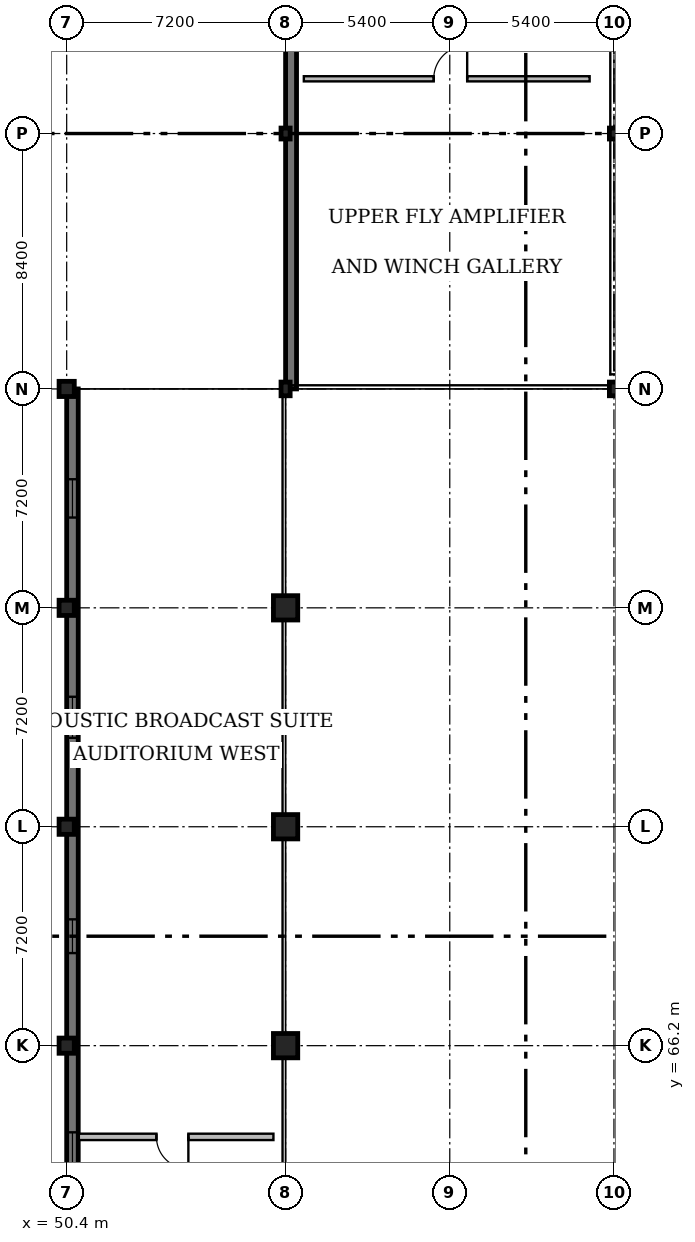
"""IFC4 building model, lengths in metres.
Left out: names, types, materials, properties, quantities, classifications, styles, units other than length and angle.
Written with IfcOpenShell. Run it as: python <this file> out.ifc"""

import sys

from ifc_helpers import new_model, si_unit, direction, frame, frame_2d, origin, origin_2d, place, context, subcontext, project, spatial, rectangle, i_section, extrude, element, fill, save


model = new_model("IFC4")
c1 = context("Model", 3, precision=1e-05, world=origin(), true_north=direction((0.0, 1.0)))
c2 = subcontext(c1, "Body", "Model", "MODEL_VIEW")
j1 = project(units=[si_unit("LENGTHUNIT", "METRE"), si_unit("PLANEANGLEUNIT", "RADIAN")], contexts=[c1])
p1 = place(None, origin())
s1 = spatial("IfcSite", under=j1, at=p1, CompositionType="ELEMENT")
p2 = place(p1, origin())
s2 = spatial("IfcBuilding", under=s1, at=p2, CompositionType="ELEMENT")
p3 = place(p2, frame((0.0, 0.0, 13.2)))
s3 = spatial("IfcBuildingStorey", under=s2, at=p3, CompositionType="ELEMENT", Elevation=13.2)
p4 = place(p3, frame((68.4, 87.8, 0.0), z_axis=(0.0, 0.0, 1.0), x_axis=(1.0, 0.0, 0.0)))
e1 = element("IfcColumn", 1, at=p4, inside=s3, PredefinedType="COLUMN", context=c2, shape_type="SweptSolid", body=[
    extrude(i_section(OverallWidth=0.3, OverallDepth=0.45, WebThickness=0.014, FlangeThickness=0.026, FilletRadius=0.027, at=origin_2d()), origin(), (0.0, 0.0, 1.0), 3.9),
])
p5 = place(p3, frame((68.4, 96.2, 0.0), z_axis=(0.0, 0.0, 1.0), x_axis=(1.0, 0.0, 0.0)))
e2 = element("IfcColumn", 2, at=p5, inside=s3, PredefinedType="COLUMN", context=c2, shape_type="SweptSolid", body=[
    extrude(i_section(OverallWidth=0.3, OverallDepth=0.36, WebThickness=0.012, FlangeThickness=0.022, FilletRadius=0.027, at=origin_2d()), origin(), (0.0, 0.0, 1.0), 3.9),
])
for number, where, z_axis, x_axis in (
    (3, (50.4, 66.2, 0.0), (0.0, 0.0, 1.0), (1.0, 0.0, 0.0)),
    (4, (50.4, 73.4, 0.0), (0.0, 0.0, 1.0), (1.0, 0.0, 0.0)),
    (5, (50.4, 80.6, 0.0), (0.0, 0.0, 1.0), (1.0, 0.0, 0.0)),
    (6, (50.4, 87.8, 0.0), (0.0, 0.0, 1.0), (1.0, 0.0, 0.0)),
):
    element("IfcColumn", number, at=place(p3, frame(where, z_axis=z_axis, x_axis=x_axis)), inside=s3, PredefinedType="COLUMN", context=c2, shape_type="SweptSolid", body=[
        extrude(rectangle(XDim=0.5, YDim=0.5, at=origin_2d()), origin(), (0.0, 0.0, 1.0), 3.9),
    ])
for number, where, z_axis, x_axis in (
    (7, (57.6, 66.2, 0.0), (0.0, 0.0, 1.0), (1.0, 0.0, 0.0)),
    (8, (57.6, 73.4, 0.0), (0.0, 0.0, 1.0), (1.0, 0.0, 0.0)),
):
    element("IfcColumn", number, at=place(p3, frame(where, z_axis=z_axis, x_axis=x_axis)), inside=s3, PredefinedType="COLUMN", context=c2, shape_type="SweptSolid", body=[
        extrude(rectangle(XDim=0.8, YDim=0.8, at=origin_2d()), origin(), (0.0, 0.0, 1.0), 7.007),
    ])
p6 = place(p3, frame((57.6, 80.6, 0.0), z_axis=(0.0, 0.0, 1.0), x_axis=(1.0, 0.0, 0.0)))
e9 = element("IfcColumn", 9, at=p6, inside=s3, PredefinedType="COLUMN", context=c2, shape_type="SweptSolid", body=[
    extrude(rectangle(XDim=0.8, YDim=0.8, at=origin_2d()), origin(), (0.0, 0.0, 1.0), 5.542),
])
p7 = place(p3, frame((57.6, 87.8, 0.0), z_axis=(0.0, 0.0, 1.0), x_axis=(1.0, 0.0, 0.0)))
e10 = element("IfcColumn", 10, at=p7, inside=s3, PredefinedType="COLUMN", context=c2, shape_type="SweptSolid", body=[
    extrude(i_section(OverallWidth=0.3, OverallDepth=0.45, WebThickness=0.014, FlangeThickness=0.026, FilletRadius=0.027, at=origin_2d()), origin(), (0.0, 0.0, 1.0), 3.9),
])
p8 = place(p3, frame((57.6, 96.2, 0.0), z_axis=(0.0, 0.0, 1.0), x_axis=(1.0, 0.0, 0.0)))
e11 = element("IfcColumn", 11, at=p8, inside=s3, PredefinedType="COLUMN", context=c2, shape_type="SweptSolid", body=[
    extrude(i_section(OverallWidth=0.3, OverallDepth=0.36, WebThickness=0.012, FlangeThickness=0.022, FilletRadius=0.027, at=origin_2d()), origin(), (0.0, 0.0, 1.0), 3.9),
])
p9 = place(p3, frame((50.59, 51.8, 0.0), z_axis=(0.0, 0.0, 1.0), x_axis=(0.0, 1.0, 0.0)))
e12 = element("IfcWall", 12, at=p9, inside=s3, PredefinedType="SOLIDWALL", context=c2, shape_type="SweptSolid", body=[
    extrude(rectangle(XDim=36.0, YDim=0.38, at=frame_2d((18.0, 0.0))), origin(), (0.0, 0.0, 1.0), 3.65),
])
p10 = place(p9, frame((2.975, 0.0, 0.95)))
e13 = element("IfcOpeningElement", 13, at=p10, cuts=e12, PredefinedType="OPENING", context=c2, shape_type="SweptSolid", body=[
    extrude(rectangle(XDim=1.25, YDim=1.9, at=frame_2d((0.625, 0.95))), frame((0.0, 0.21, 0.0), z_axis=(0.0, -1.0, 0.0), x_axis=(1.0, 0.0, 0.0)), (0.0, 0.0, 1.0), 0.42),
])
p11 = place(p9, frame((10.05, 0.0, 0.95)))
e14 = element("IfcOpeningElement", 14, at=p11, cuts=e12, PredefinedType="OPENING", context=c2, shape_type="SweptSolid", body=[
    extrude(rectangle(XDim=1.5, YDim=2.0, at=frame_2d((0.75, 1.0))), frame((0.0, 0.21, 0.0), z_axis=(0.0, -1.0, 0.0), x_axis=(1.0, 0.0, 0.0)), (0.0, 0.0, 1.0), 0.42),
])
p12 = place(p9, frame((17.445, 0.0, 0.95)))
e15 = element("IfcOpeningElement", 15, at=p12, cuts=e12, PredefinedType="OPENING", context=c2, shape_type="SweptSolid", body=[
    extrude(rectangle(XDim=1.11, YDim=1.85, at=frame_2d((0.555, 0.925))), frame((0.0, 0.21, 0.0), z_axis=(0.0, -1.0, 0.0), x_axis=(1.0, 0.0, 0.0)), (0.0, 0.0, 1.0), 0.42),
])
p13 = place(p9, frame((24.525, 0.0, 0.95)))
e16 = element("IfcOpeningElement", 16, at=p13, cuts=e12, PredefinedType="OPENING", context=c2, shape_type="SweptSolid", body=[
    extrude(rectangle(XDim=1.35, YDim=1.7, at=frame_2d((0.675, 0.85))), frame((0.0, 0.21, 0.0), z_axis=(0.0, -1.0, 0.0), x_axis=(1.0, 0.0, 0.0)), (0.0, 0.0, 1.0), 0.42),
])
p14 = place(p9, frame((31.77, 0.0, 0.95)))
e17 = element("IfcOpeningElement", 17, at=p14, cuts=e12, PredefinedType="OPENING", context=c2, shape_type="SweptSolid", body=[
    extrude(rectangle(XDim=1.26, YDim=1.65, at=frame_2d((0.63, 0.825))), frame((0.0, 0.21, 0.0), z_axis=(0.0, -1.0, 0.0), x_axis=(1.0, 0.0, 0.0)), (0.0, 0.0, 1.0), 0.42),
])
p15 = place(p3, frame((57.78, 87.8, 0.0), z_axis=(0.0, 0.0, 1.0), x_axis=(0.0, 1.0, 0.0)))
e18 = element("IfcWall", 18, at=p15, inside=s3, PredefinedType="SOLIDWALL", context=c2, shape_type="SweptSolid", body=[
    extrude(rectangle(XDim=24.0, YDim=0.36, at=frame_2d((12.0, 0.0))), origin(), (0.0, 0.0, 1.0), 3.65),
])
p16 = place(p3, frame((57.2, 63.2, 0.0), z_axis=(0.0, 0.0, 1.0), x_axis=(-1.0, 0.0, 0.0)))
e19 = element("IfcWall", 19, at=p16, inside=s3, PredefinedType="PARTITIONING", context=c2, shape_type="SweptSolid", body=[
    extrude(rectangle(XDim=6.4, YDim=0.21, at=frame_2d((3.2, 0.0))), origin(), (0.0, 0.0, 1.0), 3.66),
])
p17 = place(p16, frame((2.797, 0.0, 0.0)))
e20 = element("IfcOpeningElement", 20, at=p17, cuts=e19, PredefinedType="OPENING", context=c2, shape_type="SweptSolid", body=[
    extrude(rectangle(XDim=1.05, YDim=2.15, at=frame_2d((0.525, 1.075))), frame((0.0, 0.125, 0.0), z_axis=(0.0, -1.0, 0.0), x_axis=(1.0, 0.0, 0.0)), (0.0, 0.0, 1.0), 0.25),
])
p18 = place(p3, frame((58.2, 98.0, 0.0), z_axis=(0.0, 0.0, 1.0), x_axis=(1.0, 0.0, 0.0)))
e21 = element("IfcWall", 21, at=p18, inside=s3, PredefinedType="PARTITIONING", context=c2, shape_type="SweptSolid", body=[
    extrude(rectangle(XDim=9.4, YDim=0.17, at=frame_2d((4.7, 0.0))), origin(), (0.0, 0.0, 1.0), 3.65),
])
p19 = place(p18, frame((4.273, 0.0, 0.0)))
e22 = element("IfcOpeningElement", 22, at=p19, cuts=e21, PredefinedType="OPENING", context=c2, shape_type="SweptSolid", body=[
    extrude(rectangle(XDim=1.1, YDim=2.1, at=frame_2d((0.55, 1.05))), frame((0.0, 0.105, 0.0), z_axis=(0.0, -1.0, 0.0), x_axis=(1.0, 0.0, 0.0)), (0.0, 0.0, 1.0), 0.21),
])
p20 = place(p11, origin())
e23 = element("IfcWindow", 23, at=p20, inside=s3, PartitioningType="SINGLE_PANEL", PredefinedType="WINDOW", context=c2, shape_type="SweptSolid", body=[
    extrude(rectangle(XDim=1.5, YDim=2.0, at=frame_2d((0.75, 1.0))), frame((0.0, 0.03, 0.0), z_axis=(0.0, -1.0, 0.0), x_axis=(1.0, 0.0, 0.0)), (0.0, 0.0, 1.0), 0.06),
])
fill(e14, e23)
p21 = place(p12, origin())
e24 = element("IfcWindow", 24, at=p21, inside=s3, PartitioningType="SINGLE_PANEL", PredefinedType="WINDOW", context=c2, shape_type="SweptSolid", body=[
    extrude(rectangle(XDim=1.11, YDim=1.85, at=frame_2d((0.555, 0.925))), frame((0.0, 0.03, 0.0), z_axis=(0.0, -1.0, 0.0), x_axis=(1.0, 0.0, 0.0)), (0.0, 0.0, 1.0), 0.06),
])
fill(e15, e24)
p22 = place(p13, origin())
e25 = element("IfcWindow", 25, at=p22, inside=s3, PartitioningType="SINGLE_PANEL", PredefinedType="WINDOW", context=c2, shape_type="SweptSolid", body=[
    extrude(rectangle(XDim=1.35, YDim=1.7, at=frame_2d((0.675, 0.85))), frame((0.0, 0.03, 0.0), z_axis=(0.0, -1.0, 0.0), x_axis=(1.0, 0.0, 0.0)), (0.0, 0.0, 1.0), 0.06),
])
fill(e16, e25)
p23 = place(p14, origin())
e26 = element("IfcWindow", 26, at=p23, inside=s3, PartitioningType="SINGLE_PANEL", PredefinedType="WINDOW", context=c2, shape_type="SweptSolid", body=[
    extrude(rectangle(XDim=1.26, YDim=1.65, at=frame_2d((0.63, 0.825))), frame((0.0, 0.03, 0.0), z_axis=(0.0, -1.0, 0.0), x_axis=(1.0, 0.0, 0.0)), (0.0, 0.0, 1.0), 0.06),
])
fill(e17, e26)
p24 = place(p17, origin())
e27 = element("IfcDoor", 27, at=p24, inside=s3, OperationType="SINGLE_SWING_LEFT", PredefinedType="DOOR", context=c2, shape_type="SweptSolid", body=[
    extrude(rectangle(XDim=1.05, YDim=2.15, at=frame_2d((0.525, 1.075))), frame((0.0, 0.025, 0.0), z_axis=(0.0, -1.0, 0.0), x_axis=(1.0, 0.0, 0.0)), (0.0, 0.0, 1.0), 0.05),
])
fill(e20, e27)
p25 = place(p19, origin())
e28 = element("IfcDoor", 28, at=p25, inside=s3, OperationType="SINGLE_SWING_RIGHT", PredefinedType="DOOR", context=c2, shape_type="SweptSolid", body=[
    extrude(rectangle(XDim=1.1, YDim=2.1, at=frame_2d((0.55, 1.05))), frame((0.0, 0.025, 0.0), z_axis=(0.0, -1.0, 0.0), x_axis=(1.0, 0.0, 0.0)), (0.0, 0.0, 1.0), 0.05),
])
fill(e22, e28)
save(model, sys.argv[1])
